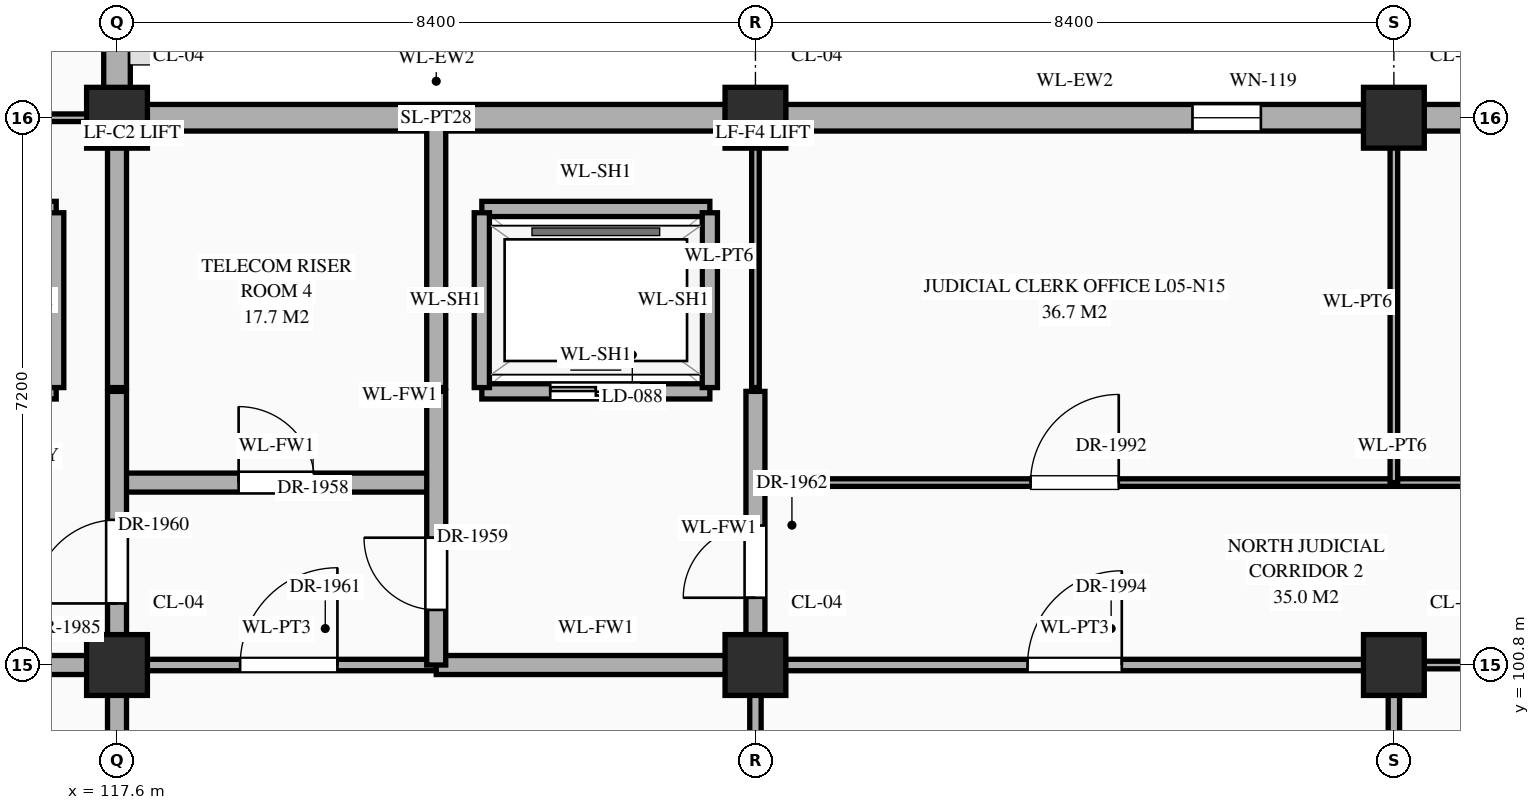
"""IFC4 building model, lengths in metres.
Left out: names, types, materials, properties, quantities, classifications, styles, units other than length and angle.
Written with IfcOpenShell. Run it as: python <this file> out.ifc"""

import sys

from ifc_helpers import new_model, si_unit, direction, frame, frame_2d, origin, origin_2d, place, context, subcontext, project, spatial, rectangle, extrude, element, fill, save


model = new_model("IFC4")
c1 = context("Model", 3, precision=1e-05, world=origin(), true_north=direction((0.0, 1.0)))
c2 = subcontext(c1, "Body", "Model", "MODEL_VIEW")
j1 = project(units=[si_unit("LENGTHUNIT", "METRE"), si_unit("PLANEANGLEUNIT", "RADIAN")], contexts=[c1])
p1 = place(None, origin())
s1 = spatial("IfcSite", under=j1, at=p1, CompositionType="ELEMENT")
p2 = place(p1, origin())
s2 = spatial("IfcBuilding", under=s1, at=p2, CompositionType="ELEMENT")
p3 = place(p2, frame((0.0, 0.0, 21.6)))
s3 = spatial("IfcBuildingStorey", under=s2, at=p3, CompositionType="ELEMENT", Elevation=21.6)
for number, where, z_axis, x_axis in (
    (1, (117.6, 100.8, 0.0), (0.0, 0.0, 1.0), (1.0, 0.0, 0.0)),
    (2, (117.6, 108.0, 0.0), (0.0, 0.0, 1.0), (1.0, 0.0, 0.0)),
    (3, (126.0, 100.8, 0.0), (0.0, 0.0, 1.0), (1.0, 0.0, 0.0)),
    (4, (126.0, 108.0, 0.0), (0.0, 0.0, 1.0), (1.0, 0.0, 0.0)),
    (5, (134.4, 100.8, 0.0), (0.0, 0.0, 1.0), (1.0, 0.0, 0.0)),
    (6, (134.4, 108.0, 0.0), (0.0, 0.0, 1.0), (1.0, 0.0, 0.0)),
):
    element("IfcColumn", number, at=place(p3, frame(where, z_axis=z_axis, x_axis=x_axis)), inside=s3, PredefinedType="COLUMN", context=c2, shape_type="SweptSolid", body=[
        extrude(rectangle(XDim=0.8, YDim=0.8, at=origin_2d()), origin(), (0.0, 0.0, 1.0), 4.5),
    ])
p4 = place(p3, frame((117.6, 108.395, 0.0), z_axis=(0.0, 0.0, 1.0), x_axis=(0.0, 1.0, 0.0)))
e7 = element("IfcWall", 7, at=p4, inside=s3, PredefinedType="STANDARD", context=c2, shape_type="SweptSolid", body=[
    extrude(rectangle(XDim=6.41, YDim=0.35, at=frame_2d((3.205, 0.0))), origin(), (0.0, 0.0, 1.0), 3.59),
])
p5 = place(p4, frame((3.73, 0.0, 0.85)))
e8 = element("IfcOpeningElement", 8, at=p5, cuts=e7, PredefinedType="OPENING", context=c2, shape_type="SweptSolid", body=[
    extrude(rectangle(XDim=1.55, YDim=1.2, at=frame_2d((0.775, 0.6))), frame((0.0, 0.187, 0.0), z_axis=(0.0, -1.0, 0.0), x_axis=(1.0, 0.0, 0.0)), (0.0, 0.0, 1.0), 0.374),
])
p6 = place(p3, frame((117.995, 108.0, 0.0), z_axis=(0.0, 0.0, 1.0), x_axis=(1.0, 0.0, 0.0)))
e9 = element("IfcWall", 9, at=p6, inside=s3, PredefinedType="STANDARD", context=c2, shape_type="SweptSolid", body=[
    extrude(rectangle(XDim=7.61, YDim=0.35, at=frame_2d((3.805, 0.0))), origin(), (0.0, 0.0, 1.0), 3.59),
])
p7 = place(p3, frame((126.395, 108.0, 0.0), z_axis=(0.0, 0.0, 1.0), x_axis=(1.0, 0.0, 0.0)))
e10 = element("IfcWall", 10, at=p7, inside=s3, PredefinedType="STANDARD", context=c2, shape_type="SweptSolid", body=[
    extrude(rectangle(XDim=7.61, YDim=0.35, at=frame_2d((3.805, 0.0))), origin(), (0.0, 0.0, 1.0), 3.59),
])
p8 = place(p7, frame((5.355, 0.0, 0.85)))
e11 = element("IfcOpeningElement", 11, at=p8, cuts=e10, PredefinedType="OPENING", context=c2, shape_type="SweptSolid", body=[
    extrude(rectangle(XDim=0.9, YDim=1.92, at=frame_2d((0.45, 0.96))), frame((0.0, 0.187, 0.0), z_axis=(0.0, -1.0, 0.0), x_axis=(1.0, 0.0, 0.0)), (0.0, 0.0, 1.0), 0.374),
])
p9 = place(p3, frame((134.795, 108.0, 0.0), z_axis=(0.0, 0.0, 1.0), x_axis=(1.0, 0.0, 0.0)))
e12 = element("IfcWall", 12, at=p9, inside=s3, PredefinedType="STANDARD", context=c2, shape_type="SweptSolid", body=[
    extrude(rectangle(XDim=7.61, YDim=0.35, at=frame_2d((3.805, 0.0))), origin(), (0.0, 0.0, 1.0), 3.59),
])
p10 = place(p9, frame((5.355, 0.0, 0.85)))
e13 = element("IfcOpeningElement", 13, at=p10, cuts=e12, PredefinedType="OPENING", context=c2, shape_type="SweptSolid", body=[
    extrude(rectangle(XDim=0.9, YDim=2.12, at=frame_2d((0.45, 1.06))), frame((0.0, 0.187, 0.0), z_axis=(0.0, -1.0, 0.0), x_axis=(1.0, 0.0, 0.0)), (0.0, 0.0, 1.0), 0.374),
])
p11 = place(p3, frame((113.4, 100.8, 0.0), z_axis=(0.0, 0.0, 1.0), x_axis=(1.0, 0.0, 0.0)))
e14 = element("IfcWall", 14, at=p11, inside=s3, PredefinedType="STANDARD", context=c2, shape_type="SweptSolid", body=[
    extrude(rectangle(XDim=4.2, YDim=0.25, at=frame_2d((2.1, 0.0))), origin(), (0.0, 0.0, 1.0), 3.39),
])
p12 = place(p11, frame((0.25, 0.0, 0.0)))
e15 = element("IfcOpeningElement", 15, at=p12, cuts=e14, PredefinedType="OPENING", context=c2, shape_type="SweptSolid", body=[
    extrude(rectangle(XDim=1.1, YDim=2.2, at=frame_2d((0.55, 1.1))), frame((0.0, 0.137, 0.0), z_axis=(0.0, -1.0, 0.0), x_axis=(1.0, 0.0, 0.0)), (0.0, 0.0, 1.0), 0.274),
])
p13 = place(p11, frame((2.24, 0.0, 0.0)))
e16 = element("IfcOpeningElement", 16, at=p13, cuts=e14, PredefinedType="OPENING", context=c2, shape_type="SweptSolid", body=[
    extrude(rectangle(XDim=1.0, YDim=2.2, at=frame_2d((0.5, 1.1))), frame((0.0, 0.137, 0.0), z_axis=(0.0, -1.0, 0.0), x_axis=(1.0, 0.0, 0.0)), (0.0, 0.0, 1.0), 0.274),
])
p14 = place(p3, frame((117.6, 100.8, 0.0), z_axis=(0.0, 0.0, 1.0), x_axis=(1.0, 0.0, 0.0)))
e17 = element("IfcWall", 17, at=p14, inside=s3, PredefinedType="STANDARD", context=c2, shape_type="SweptSolid", body=[
    extrude(rectangle(XDim=4.2, YDim=0.15, at=frame_2d((2.1, 0.0))), origin(), (0.0, 0.0, 1.0), 3.39),
])
p15 = place(p14, frame((1.62, 0.0, 0.0)))
e18 = element("IfcOpeningElement", 18, at=p15, cuts=e17, PredefinedType="OPENING", context=c2, shape_type="SweptSolid", body=[
    extrude(rectangle(XDim=1.28, YDim=2.35, at=frame_2d((0.64, 1.175))), frame((0.0, 0.087, 0.0), z_axis=(0.0, -1.0, 0.0), x_axis=(1.0, 0.0, 0.0)), (0.0, 0.0, 1.0), 0.174),
])
p16 = place(p3, frame((121.8, 100.8, 0.0), z_axis=(0.0, 0.0, 1.0), x_axis=(1.0, 0.0, 0.0)))
e19 = element("IfcWall", 19, at=p16, inside=s3, PredefinedType="STANDARD", context=c2, shape_type="SweptSolid", body=[
    extrude(rectangle(XDim=4.2, YDim=0.25, at=frame_2d((2.1, 0.0))), origin(), (0.0, 0.0, 1.0), 3.39),
])
p17 = place(p3, frame((126.0, 100.8, 0.0), z_axis=(0.0, 0.0, 1.0), x_axis=(1.0, 0.0, 0.0)))
e20 = element("IfcWall", 20, at=p17, inside=s3, PredefinedType="STANDARD", context=c2, shape_type="SweptSolid", body=[
    extrude(rectangle(XDim=8.4, YDim=0.15, at=frame_2d((4.2, 0.0))), origin(), (0.0, 0.0, 1.0), 3.39),
])
p18 = place(p17, frame((3.58, 0.0, 0.0)))
e21 = element("IfcOpeningElement", 21, at=p18, cuts=e20, PredefinedType="OPENING", context=c2, shape_type="SweptSolid", body=[
    extrude(rectangle(XDim=1.24, YDim=2.3, at=frame_2d((0.62, 1.15))), frame((0.0, 0.087, 0.0), z_axis=(0.0, -1.0, 0.0), x_axis=(1.0, 0.0, 0.0)), (0.0, 0.0, 1.0), 0.174),
])
p19 = place(p3, frame((134.4, 100.8, 0.0), z_axis=(0.0, 0.0, 1.0), x_axis=(1.0, 0.0, 0.0)))
e22 = element("IfcWall", 22, at=p19, inside=s3, PredefinedType="STANDARD", context=c2, shape_type="SweptSolid", body=[
    extrude(rectangle(XDim=5.8, YDim=0.1, at=frame_2d((2.9, 0.0))), origin(), (0.0, 0.0, 1.0), 3.39),
])
p20 = place(p19, frame((1.22, 0.0, 0.0)))
e23 = element("IfcOpeningElement", 23, at=p20, cuts=e22, PredefinedType="OPENING", context=c2, shape_type="SweptSolid", body=[
    extrude(rectangle(XDim=1.28, YDim=2.35, at=frame_2d((0.64, 1.175))), frame((0.0, 0.062, 0.0), z_axis=(0.0, -1.0, 0.0), x_axis=(1.0, 0.0, 0.0)), (0.0, 0.0, 1.0), 0.124),
])
p21 = place(p19, frame((4.13, 0.0, 0.0)))
e24 = element("IfcOpeningElement", 24, at=p21, cuts=e22, PredefinedType="OPENING", context=c2, shape_type="SweptSolid", body=[
    extrude(rectangle(XDim=0.94, YDim=2.3, at=frame_2d((0.47, 1.15))), frame((0.0, 0.062, 0.0), z_axis=(0.0, -1.0, 0.0), x_axis=(1.0, 0.0, 0.0)), (0.0, 0.0, 1.0), 0.124),
])
p22 = place(p3, frame((117.6, 103.2, 0.0), z_axis=(0.0, 0.0, 1.0), x_axis=(1.0, 0.0, 0.0)))
e25 = element("IfcWall", 25, at=p22, inside=s3, PredefinedType="STANDARD", context=c2, shape_type="SweptSolid", body=[
    extrude(rectangle(XDim=4.2, YDim=0.25, at=frame_2d((2.1, 0.0))), origin(), (0.0, 0.0, 1.0), 4.24),
])
p23 = place(p22, frame((1.6, 0.0, 0.0)))
e26 = element("IfcOpeningElement", 26, at=p23, cuts=e25, PredefinedType="OPENING", context=c2, shape_type="SweptSolid", body=[
    extrude(rectangle(XDim=1.0, YDim=2.2, at=frame_2d((0.5, 1.1))), frame((0.0, 0.137, 0.0), z_axis=(0.0, -1.0, 0.0), x_axis=(1.0, 0.0, 0.0)), (0.0, 0.0, 1.0), 0.274),
])
p24 = place(p3, frame((126.0, 103.2, 0.0), z_axis=(0.0, 0.0, 1.0), x_axis=(1.0, 0.0, 0.0)))
e27 = element("IfcWall", 27, at=p24, inside=s3, PredefinedType="STANDARD", context=c2, shape_type="SweptSolid", body=[
    extrude(rectangle(XDim=16.76, YDim=0.1, at=frame_2d((8.38, 0.0))), origin(), (0.0, 0.0, 1.0), 4.24),
])
p25 = place(p24, frame((3.62, 0.0, 0.0)))
e28 = element("IfcOpeningElement", 28, at=p25, cuts=e27, PredefinedType="OPENING", context=c2, shape_type="SweptSolid", body=[
    extrude(rectangle(XDim=1.16, YDim=2.3, at=frame_2d((0.58, 1.15))), frame((0.0, 0.062, 0.0), z_axis=(0.0, -1.0, 0.0), x_axis=(1.0, 0.0, 0.0)), (0.0, 0.0, 1.0), 0.124),
])
p26 = place(p24, frame((11.98, 0.0, 0.0)))
e29 = element("IfcOpeningElement", 29, at=p26, cuts=e27, PredefinedType="OPENING", context=c2, shape_type="SweptSolid", body=[
    extrude(rectangle(XDim=1.2, YDim=2.35, at=frame_2d((0.6, 1.175))), frame((0.0, 0.062, 0.0), z_axis=(0.0, -1.0, 0.0), x_axis=(1.0, 0.0, 0.0)), (0.0, 0.0, 1.0), 0.124),
])
p27 = place(p3, frame((114.4, 104.4, 0.0), z_axis=(0.0, 0.0, 1.0), x_axis=(1.0, 0.0, 0.0)))
e30 = element("IfcWall", 30, at=p27, inside=s3, PredefinedType="STANDARD", context=c2, shape_type="SweptSolid", body=[
    extrude(rectangle(XDim=2.4, YDim=0.2, at=frame_2d((1.2, 0.0))), origin(), (0.0, 0.0, 1.0), 4.24),
])
p28 = place(p27, frame((0.675, 0.0, 0.0)))
e31 = element("IfcOpeningElement", 31, at=p28, cuts=e30, PredefinedType="OPENING", context=c2, shape_type="SweptSolid", body=[
    extrude(rectangle(XDim=1.05, YDim=2.15, at=frame_2d((0.525, 1.075))), frame((0.0, 0.112, 0.0), z_axis=(0.0, -1.0, 0.0), x_axis=(1.0, 0.0, 0.0)), (0.0, 0.0, 1.0), 0.224),
])
p29 = place(p3, frame((122.4, 104.4, 0.0), z_axis=(0.0, 0.0, 1.0), x_axis=(1.0, 0.0, 0.0)))
e32 = element("IfcWall", 32, at=p29, inside=s3, PredefinedType="STANDARD", context=c2, shape_type="SweptSolid", body=[
    extrude(rectangle(XDim=3.0, YDim=0.2, at=frame_2d((1.5, 0.0))), origin(), (0.0, 0.0, 1.0), 4.24),
])
p30 = place(p29, frame((0.9, 0.0, 0.0)))
e33 = element("IfcOpeningElement", 33, at=p30, cuts=e32, PredefinedType="OPENING", context=c2, shape_type="SweptSolid", body=[
    extrude(rectangle(XDim=1.2, YDim=2.15, at=frame_2d((0.6, 1.075))), frame((0.0, 0.112, 0.0), z_axis=(0.0, -1.0, 0.0), x_axis=(1.0, 0.0, 0.0)), (0.0, 0.0, 1.0), 0.224),
])
p31 = place(p3, frame((114.4, 106.8, 0.0), z_axis=(0.0, 0.0, 1.0), x_axis=(1.0, 0.0, 0.0)))
e34 = element("IfcWall", 34, at=p31, inside=s3, PredefinedType="STANDARD", context=c2, shape_type="SweptSolid", body=[
    extrude(rectangle(XDim=2.4, YDim=0.2, at=frame_2d((1.2, 0.0))), origin(), (0.0, 0.0, 1.0), 4.24),
])
p32 = place(p3, frame((122.4, 106.8, 0.0), z_axis=(0.0, 0.0, 1.0), x_axis=(1.0, 0.0, 0.0)))
e35 = element("IfcWall", 35, at=p32, inside=s3, PredefinedType="STANDARD", context=c2, shape_type="SweptSolid", body=[
    extrude(rectangle(XDim=3.0, YDim=0.2, at=frame_2d((1.5, 0.0))), origin(), (0.0, 0.0, 1.0), 4.24),
])
p33 = place(p3, frame((113.45, 108.0, 0.0), z_axis=(0.0, 0.0, 1.0), x_axis=(1.0, 0.0, 0.0)))
e36 = element("IfcWall", 36, at=p33, inside=s3, PredefinedType="STANDARD", context=c2, shape_type="SweptSolid", body=[
    extrude(rectangle(XDim=4.06, YDim=0.1, at=frame_2d((2.03, 0.0))), origin(), (0.0, 0.0, 1.0), 3.39),
])
p34 = place(p3, frame((116.8, 104.45, 0.0), z_axis=(0.0, 0.0, 1.0), x_axis=(0.0, 1.0, 0.0)))
e37 = element("IfcWall", 37, at=p34, inside=s3, PredefinedType="STANDARD", context=c2, shape_type="SweptSolid", body=[
    extrude(rectangle(XDim=2.3, YDim=0.2, at=frame_2d((1.15, 0.0))), origin(), (0.0, 0.0, 1.0), 4.24),
])
p35 = place(p3, frame((117.6, 91.2, 0.0), z_axis=(0.0, 0.0, 1.0), x_axis=(0.0, 1.0, 0.0)))
e38 = element("IfcWall", 38, at=p35, inside=s3, PredefinedType="STANDARD", context=c2, shape_type="SweptSolid", body=[
    extrude(rectangle(XDim=13.2, YDim=0.25, at=frame_2d((6.6, 0.0))), origin(), (0.0, 0.0, 1.0), 3.49),
])
p36 = place(p35, frame((0.565, 0.0, 0.0)))
e39 = element("IfcOpeningElement", 39, at=p36, cuts=e38, PredefinedType="OPENING", context=c2, shape_type="SweptSolid", body=[
    extrude(rectangle(XDim=0.95, YDim=2.15, at=frame_2d((0.475, 1.075))), frame((0.0, 0.137, 0.0), z_axis=(0.0, -1.0, 0.0), x_axis=(1.0, 0.0, 0.0)), (0.0, 0.0, 1.0), 0.274),
])
p37 = place(p35, frame((10.41, 0.0, 0.0)))
e40 = element("IfcOpeningElement", 40, at=p37, cuts=e38, PredefinedType="OPENING", context=c2, shape_type="SweptSolid", body=[
    extrude(rectangle(XDim=1.1, YDim=2.2, at=frame_2d((0.55, 1.1))), frame((0.0, 0.137, 0.0), z_axis=(0.0, -1.0, 0.0), x_axis=(1.0, 0.0, 0.0)), (0.0, 0.0, 1.0), 0.274),
])
p38 = place(p35, frame((3.21, 0.0, 0.0)))
e41 = element("IfcOpeningElement", 41, at=p38, cuts=e38, PredefinedType="OPENING", context=c2, shape_type="SweptSolid", body=[
    extrude(rectangle(XDim=1.1, YDim=2.2, at=frame_2d((0.55, 1.1))), frame((0.0, 0.137, 0.0), z_axis=(0.0, -1.0, 0.0), x_axis=(1.0, 0.0, 0.0)), (0.0, 0.0, 1.0), 0.274),
])
p39 = place(p3, frame((117.6, 104.45, 0.0), z_axis=(0.0, 0.0, 1.0), x_axis=(0.0, 1.0, 0.0)))
e42 = element("IfcWall", 42, at=p39, inside=s3, PredefinedType="STANDARD", context=c2, shape_type="SweptSolid", body=[
    extrude(rectangle(XDim=3.46, YDim=0.25, at=frame_2d((1.73, 0.0))), origin(), (0.0, 0.0, 1.0), 3.49),
])
p40 = place(p3, frame((121.8, 100.8, 0.0), z_axis=(0.0, 0.0, 1.0), x_axis=(0.0, 1.0, 0.0)))
e43 = element("IfcWall", 43, at=p40, inside=s3, PredefinedType="STANDARD", context=c2, shape_type="SweptSolid", body=[
    extrude(rectangle(XDim=3.6, YDim=0.25, at=frame_2d((1.8, 0.0))), origin(), (0.0, 0.0, 1.0), 3.89),
])
p41 = place(p40, frame((0.725, 0.0, 0.0)))
e44 = element("IfcOpeningElement", 44, at=p41, cuts=e43, PredefinedType="OPENING", context=c2, shape_type="SweptSolid", body=[
    extrude(rectangle(XDim=0.95, YDim=2.15, at=frame_2d((0.475, 1.075))), frame((0.0, 0.137, 0.0), z_axis=(0.0, -1.0, 0.0), x_axis=(1.0, 0.0, 0.0)), (0.0, 0.0, 1.0), 0.274),
])
p42 = place(p3, frame((121.8, 104.45, 0.0), z_axis=(0.0, 0.0, 1.0), x_axis=(0.0, 1.0, 0.0)))
e45 = element("IfcWall", 45, at=p42, inside=s3, PredefinedType="STANDARD", context=c2, shape_type="SweptSolid", body=[
    extrude(rectangle(XDim=3.46, YDim=0.25, at=frame_2d((1.73, 0.0))), origin(), (0.0, 0.0, 1.0), 3.89),
])
for number, where, z_axis, x_axis in (
    (46, (122.4, 104.45, 0.0), (0.0, 0.0, 1.0), (0.0, 1.0, 0.0)),
    (47, (125.4, 104.45, 0.0), (0.0, 0.0, 1.0), (0.0, 1.0, 0.0)),
):
    element("IfcWall", number, at=place(p3, frame(where, z_axis=z_axis, x_axis=x_axis)), inside=s3, PredefinedType="STANDARD", context=c2, shape_type="SweptSolid", body=[
        extrude(rectangle(XDim=2.3, YDim=0.2, at=frame_2d((1.15, 0.0))), origin(), (0.0, 0.0, 1.0), 4.24),
    ])
p43 = place(p3, frame((126.0, 96.0, 0.0), z_axis=(0.0, 0.0, 1.0), x_axis=(0.0, 1.0, 0.0)))
e48 = element("IfcWall", 48, at=p43, inside=s3, PredefinedType="STANDARD", context=c2, shape_type="SweptSolid", body=[
    extrude(rectangle(XDim=4.8, YDim=0.15, at=frame_2d((2.4, 0.0))), origin(), (0.0, 0.0, 1.0), 3.49),
])
p44 = place(p3, frame((126.0, 100.8, 0.0), z_axis=(0.0, 0.0, 1.0), x_axis=(0.0, 1.0, 0.0)))
e49 = element("IfcWall", 49, at=p44, inside=s3, PredefinedType="STANDARD", context=c2, shape_type="SweptSolid", body=[
    extrude(rectangle(XDim=3.6, YDim=0.25, at=frame_2d((1.8, 0.0))), origin(), (0.0, 0.0, 1.0), 3.49),
])
p45 = place(p44, frame((0.885, 0.0, 0.0)))
e50 = element("IfcOpeningElement", 50, at=p45, cuts=e49, PredefinedType="OPENING", context=c2, shape_type="SweptSolid", body=[
    extrude(rectangle(XDim=0.95, YDim=2.15, at=frame_2d((0.475, 1.075))), frame((0.0, 0.137, 0.0), z_axis=(0.0, -1.0, 0.0), x_axis=(1.0, 0.0, 0.0)), (0.0, 0.0, 1.0), 0.274),
])
p46 = place(p3, frame((126.0, 104.45, 0.0), z_axis=(0.0, 0.0, 1.0), x_axis=(0.0, 1.0, 0.0)))
e51 = element("IfcWall", 51, at=p46, inside=s3, PredefinedType="STANDARD", context=c2, shape_type="SweptSolid", body=[
    extrude(rectangle(XDim=3.46, YDim=0.1, at=frame_2d((1.73, 0.0))), origin(), (0.0, 0.0, 1.0), 3.49),
])
p47 = place(p3, frame((134.4, 96.0, 0.0), z_axis=(0.0, 0.0, 1.0), x_axis=(0.0, 1.0, 0.0)))
e52 = element("IfcWall", 52, at=p47, inside=s3, PredefinedType="STANDARD", context=c2, shape_type="SweptSolid", body=[
    extrude(rectangle(XDim=4.8, YDim=0.15, at=frame_2d((2.4, 0.0))), origin(), (0.0, 0.0, 1.0), 4.24),
])
p48 = place(p3, frame((134.4, 103.2, 0.0), z_axis=(0.0, 0.0, 1.0), x_axis=(0.0, 1.0, 0.0)))
e53 = element("IfcWall", 53, at=p48, inside=s3, PredefinedType="STANDARD", context=c2, shape_type="SweptSolid", body=[
    extrude(rectangle(XDim=4.76, YDim=0.1, at=frame_2d((2.38, 0.0))), origin(), (0.0, 0.0, 1.0), 3.49),
])
p49 = place(p8, origin())
e54 = element("IfcWindow", 54, at=p49, inside=s3, PartitioningType="SINGLE_PANEL", PredefinedType="WINDOW", context=c2, shape_type="SweptSolid", body=[
    extrude(rectangle(XDim=0.9, YDim=1.92, at=frame_2d((0.45, 0.96))), frame((0.0, 0.03, 0.0), z_axis=(0.0, -1.0, 0.0), x_axis=(1.0, 0.0, 0.0)), (0.0, 0.0, 1.0), 0.06),
])
fill(e11, e54)
p50 = place(p30, origin())
e55 = element("IfcDoor", 55, at=p50, inside=s3, OperationType="DOUBLE_DOOR_SLIDING", PredefinedType="DOOR", context=c2, shape_type="SweptSolid", body=[
    extrude(rectangle(XDim=1.2, YDim=2.15, at=frame_2d((0.6, 1.075))), frame((0.0, 0.025, 0.0), z_axis=(0.0, -1.0, 0.0), x_axis=(1.0, 0.0, 0.0)), (0.0, 0.0, 1.0), 0.05),
])
fill(e33, e55)
p51 = place(p23, origin())
e56 = element("IfcDoor", 56, at=p51, inside=s3, OperationType="SINGLE_SWING_LEFT", PredefinedType="DOOR", context=c2, shape_type="SweptSolid", body=[
    extrude(rectangle(XDim=1.0, YDim=2.2, at=frame_2d((0.5, 1.1))), frame((0.0, 0.025, 0.0), z_axis=(0.0, -1.0, 0.0), x_axis=(1.0, 0.0, 0.0)), (0.0, 0.0, 1.0), 0.05),
])
fill(e26, e56)
p52 = place(p41, origin())
e57 = element("IfcDoor", 57, at=p52, inside=s3, OperationType="SINGLE_SWING_RIGHT", PredefinedType="DOOR", context=c2, shape_type="SweptSolid", body=[
    extrude(rectangle(XDim=0.95, YDim=2.15, at=frame_2d((0.475, 1.075))), frame((0.0, 0.025, 0.0), z_axis=(0.0, -1.0, 0.0), x_axis=(1.0, 0.0, 0.0)), (0.0, 0.0, 1.0), 0.05),
])
fill(e44, e57)
p53 = place(p37, origin())
e58 = element("IfcDoor", 58, at=p53, inside=s3, OperationType="SINGLE_SWING_LEFT", PredefinedType="DOOR", context=c2, shape_type="SweptSolid", body=[
    extrude(rectangle(XDim=1.1, YDim=2.2, at=frame_2d((0.55, 1.1))), frame((0.0, 0.025, 0.0), z_axis=(0.0, -1.0, 0.0), x_axis=(1.0, 0.0, 0.0)), (0.0, 0.0, 1.0), 0.05),
])
fill(e40, e58)
p54 = place(p15, origin())
e59 = element("IfcDoor", 59, at=p54, inside=s3, OperationType="SINGLE_SWING_RIGHT", PredefinedType="DOOR", context=c2, shape_type="SweptSolid", body=[
    extrude(rectangle(XDim=1.28, YDim=2.35, at=frame_2d((0.64, 1.175))), frame((0.0, 0.025, 0.0), z_axis=(0.0, -1.0, 0.0), x_axis=(1.0, 0.0, 0.0)), (0.0, 0.0, 1.0), 0.05),
])
fill(e18, e59)
p55 = place(p45, origin())
e60 = element("IfcDoor", 60, at=p55, inside=s3, OperationType="SINGLE_SWING_LEFT", PredefinedType="DOOR", context=c2, shape_type="SweptSolid", body=[
    extrude(rectangle(XDim=0.95, YDim=2.15, at=frame_2d((0.475, 1.075))), frame((0.0, 0.025, 0.0), z_axis=(0.0, -1.0, 0.0), x_axis=(1.0, 0.0, 0.0)), (0.0, 0.0, 1.0), 0.05),
])
fill(e50, e60)
p56 = place(p25, origin())
e61 = element("IfcDoor", 61, at=p56, inside=s3, OperationType="SINGLE_SWING_RIGHT", PredefinedType="DOOR", context=c2, shape_type="SweptSolid", body=[
    extrude(rectangle(XDim=1.16, YDim=2.3, at=frame_2d((0.58, 1.15))), frame((0.0, 0.025, 0.0), z_axis=(0.0, -1.0, 0.0), x_axis=(1.0, 0.0, 0.0)), (0.0, 0.0, 1.0), 0.05),
])
fill(e28, e61)
p57 = place(p18, origin())
e62 = element("IfcDoor", 62, at=p57, inside=s3, OperationType="SINGLE_SWING_RIGHT", PredefinedType="DOOR", context=c2, shape_type="SweptSolid", body=[
    extrude(rectangle(XDim=1.24, YDim=2.3, at=frame_2d((0.62, 1.15))), frame((0.0, 0.025, 0.0), z_axis=(0.0, -1.0, 0.0), x_axis=(1.0, 0.0, 0.0)), (0.0, 0.0, 1.0), 0.05),
])
fill(e21, e62)
save(model, sys.argv[1])
